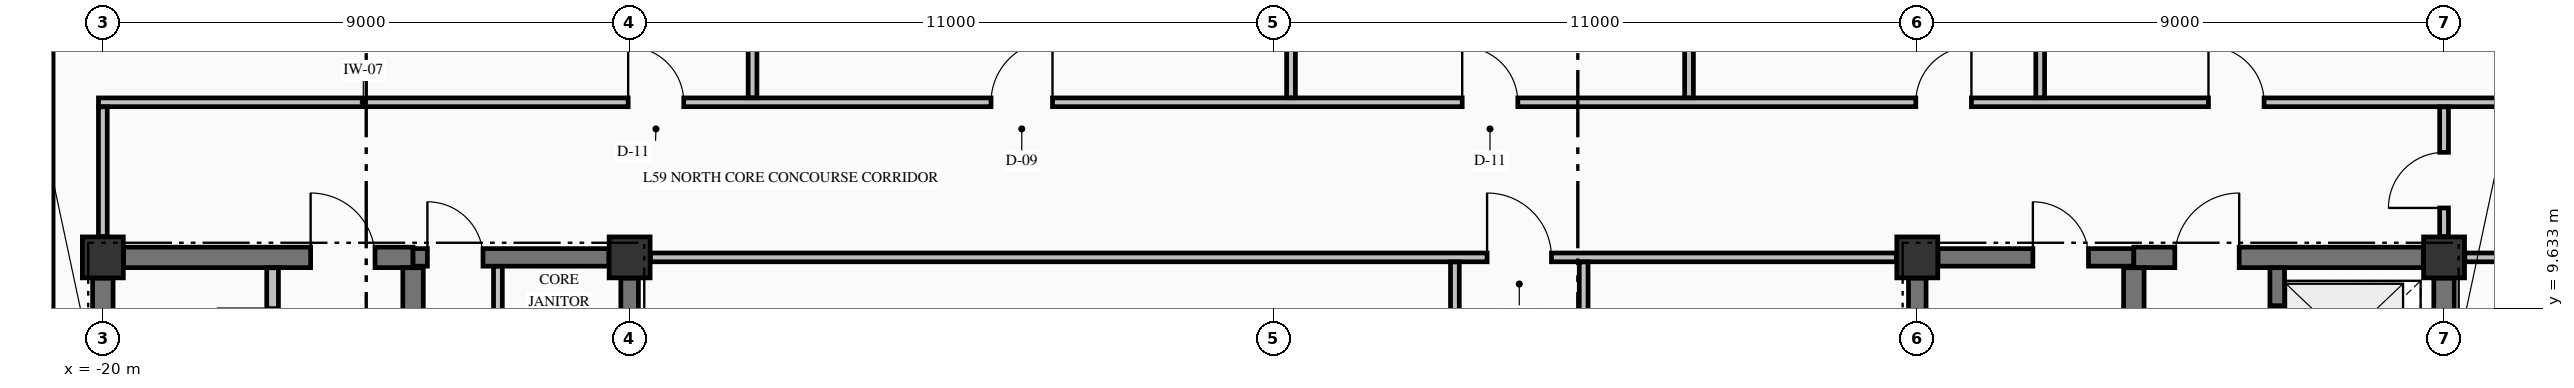
"""IFC4 building model, lengths in metres.
Left out: names, types, materials, properties, quantities, classifications, styles, units other than length and angle.
Written with IfcOpenShell. Run it as: python <this file> out.ifc"""

import sys

from ifc_helpers import new_model, si_unit, direction, frame, frame_2d, origin, origin_2d, place, context, subcontext, project, spatial, rectangle, extrude, element, fill, save


model = new_model("IFC4")
c1 = context("Model", 3, precision=1e-05, world=origin(), true_north=direction((0.0, 1.0)))
c2 = subcontext(c1, "Body", "Model", "MODEL_VIEW")
j1 = project(units=[si_unit("LENGTHUNIT", "METRE"), si_unit("PLANEANGLEUNIT", "RADIAN")], contexts=[c1])
p1 = place(None, origin())
s1 = spatial("IfcSite", under=j1, at=p1, CompositionType="ELEMENT")
p2 = place(p1, origin())
s2 = spatial("IfcBuilding", under=s1, at=p2, CompositionType="ELEMENT")
p3 = place(p2, frame((0.0, 0.0, 226.82)))
s3 = spatial("IfcBuildingStorey", under=s2, at=p3, CompositionType="ELEMENT", Elevation=226.82)
for number, where, z_axis, x_axis in (
    (1, (-20.0, 10.5, -0.425), (0.0, 0.0, 1.0), (1.0, 0.0, 0.0)),
    (2, (-11.0, 10.5, -0.425), (0.0, 0.0, 1.0), (1.0, 0.0, 0.0)),
    (3, (11.0, 10.5, -0.425), (0.0, 0.0, 1.0), (1.0, 0.0, 0.0)),
    (4, (20.0, 10.5, -0.425), (0.0, 0.0, 1.0), (1.0, 0.0, 0.0)),
):
    element("IfcColumn", number, at=place(p3, frame(where, z_axis=z_axis, x_axis=x_axis)), inside=s3, PredefinedType="COLUMN", context=c2, shape_type="SweptSolid", body=[
        extrude(rectangle(XDim=0.7, YDim=0.7, at=origin_2d()), origin(), (0.0, 0.0, 1.0), 3.405),
    ])
p4 = place(p3, frame((-21.0, 17.545, 0.0), z_axis=(0.0, 0.0, 1.0), x_axis=(0.0, -1.0, 0.0)))
e5 = element("IfcWall", 5, at=p4, inside=s3, PredefinedType="STANDARD", context=c2, shape_type="SweptSolid", body=[
    extrude(rectangle(XDim=8.09, YDim=0.3, at=frame_2d((4.045, 0.0))), origin(), (0.0, 0.0, 1.0), 2.372),
])
p5 = place(p3, frame((-19.646, 10.5, 0.0), z_axis=(0.0, 0.0, 1.0), x_axis=(1.0, 0.0, 0.0)))
e6 = element("IfcWall", 6, at=p5, inside=s3, PredefinedType="SHEAR", context=c2, shape_type="SweptSolid", body=[
    extrude(rectangle(XDim=4.946, YDim=0.35, at=frame_2d((2.473, 0.0))), origin(), (0.0, 0.0, 1.0), 2.98),
])
p6 = place(p5, frame((3.196, 0.0, 0.0)))
e7 = element("IfcOpeningElement", 7, at=p6, cuts=e6, PredefinedType="OPENING", context=c2, shape_type="SweptSolid", body=[
    extrude(rectangle(XDim=1.1, YDim=2.15, at=frame_2d((0.55, 1.075))), frame((0.0, 0.185, 0.0), z_axis=(0.0, -1.0, 0.0), x_axis=(1.0, 0.0, 0.0)), (0.0, 0.0, 1.0), 0.37),
])
p7 = place(p3, frame((-14.7, 10.5, 0.0), z_axis=(0.0, 0.0, 1.0), x_axis=(1.0, 0.0, 0.0)))
e8 = element("IfcWall", 8, at=p7, inside=s3, PredefinedType="SHEAR", context=c2, shape_type="SweptSolid", body=[
    extrude(rectangle(XDim=3.346, YDim=0.3, at=frame_2d((1.673, 0.0))), origin(), (0.0, 0.0, 1.0), 2.98),
])
p8 = place(p7, frame((0.245, 0.0, 0.0)))
e9 = element("IfcOpeningElement", 9, at=p8, cuts=e8, PredefinedType="OPENING", context=c2, shape_type="SweptSolid", body=[
    extrude(rectangle(XDim=0.95, YDim=2.15, at=frame_2d((0.475, 1.075))), frame((0.0, 0.16, 0.0), z_axis=(0.0, -1.0, 0.0), x_axis=(1.0, 0.0, 0.0)), (0.0, 0.0, 1.0), 0.32),
])
p9 = place(p3, frame((11.354, 10.5, 0.0), z_axis=(0.0, 0.0, 1.0), x_axis=(1.0, 0.0, 0.0)))
e10 = element("IfcWall", 10, at=p9, inside=s3, PredefinedType="SHEAR", context=c2, shape_type="SweptSolid", body=[
    extrude(rectangle(XDim=3.346, YDim=0.3, at=frame_2d((1.673, 0.0))), origin(), (0.0, 0.0, 1.0), 2.98),
])
p10 = place(p9, frame((1.621, 0.0, 0.0)))
e11 = element("IfcOpeningElement", 11, at=p10, cuts=e10, PredefinedType="OPENING", context=c2, shape_type="SweptSolid", body=[
    extrude(rectangle(XDim=0.95, YDim=2.15, at=frame_2d((0.475, 1.075))), frame((0.0, 0.16, 0.0), z_axis=(0.0, -1.0, 0.0), x_axis=(1.0, 0.0, 0.0)), (0.0, 0.0, 1.0), 0.32),
])
p11 = place(p3, frame((14.7, 10.5, 0.0), z_axis=(0.0, 0.0, 1.0), x_axis=(1.0, 0.0, 0.0)))
e12 = element("IfcWall", 12, at=p11, inside=s3, PredefinedType="SHEAR", context=c2, shape_type="SweptSolid", body=[
    extrude(rectangle(XDim=4.946, YDim=0.35, at=frame_2d((2.473, 0.0))), origin(), (0.0, 0.0, 1.0), 2.98),
])
p12 = place(p11, frame((0.7, 0.0, 0.0)))
e13 = element("IfcOpeningElement", 13, at=p12, cuts=e12, PredefinedType="OPENING", context=c2, shape_type="SweptSolid", body=[
    extrude(rectangle(XDim=1.1, YDim=2.15, at=frame_2d((0.55, 1.075))), frame((0.0, 0.185, 0.0), z_axis=(0.0, -1.0, 0.0), x_axis=(1.0, 0.0, 0.0)), (0.0, 0.0, 1.0), 0.37),
])
p13 = place(p3, frame((-10.644, 10.5, 0.0), z_axis=(0.0, 0.0, 1.0), x_axis=(1.0, 0.0, 0.0)))
e14 = element("IfcWall", 14, at=p13, inside=s3, PredefinedType="PARTITIONING", context=c2, shape_type="SweptSolid", body=[
    extrude(rectangle(XDim=21.288, YDim=0.15, at=frame_2d((10.644, 0.0))), origin(), (0.0, 0.0, 1.0), 2.98),
])
p14 = place(p13, frame((14.294, 0.0, 0.0)))
e15 = element("IfcOpeningElement", 15, at=p14, cuts=e14, PredefinedType="OPENING", context=c2, shape_type="SweptSolid", body=[
    extrude(rectangle(XDim=1.1, YDim=2.15, at=frame_2d((0.55, 1.075))), frame((0.0, 0.085, 0.0), z_axis=(0.0, -1.0, 0.0), x_axis=(1.0, 0.0, 0.0)), (0.0, 0.0, 1.0), 0.17),
])
p15 = place(p3, frame((20.356, 10.5, 0.0), z_axis=(0.0, 0.0, 1.0), x_axis=(1.0, 0.0, 0.0)))
e16 = element("IfcWall", 16, at=p15, inside=s3, PredefinedType="PARTITIONING", context=c2, shape_type="SweptSolid", body=[
    extrude(rectangle(XDim=5.479, YDim=0.15, at=frame_2d((2.74, 0.0))), origin(), (0.0, 0.0, 1.0), 2.98),
])
p16 = place(p15, frame((2.169, 0.0, 0.0)))
e17 = element("IfcOpeningElement", 17, at=p16, cuts=e16, PredefinedType="OPENING", context=c2, shape_type="SweptSolid", body=[
    extrude(rectangle(XDim=0.95, YDim=2.15, at=frame_2d((0.475, 1.075))), frame((0.0, 0.085, 0.0), z_axis=(0.0, -1.0, 0.0), x_axis=(1.0, 0.0, 0.0)), (0.0, 0.0, 1.0), 0.17),
])
p17 = place(p3, frame((-20.075, 13.15, 0.0), z_axis=(0.0, 0.0, 1.0), x_axis=(1.0, 0.0, 0.0)))
e18 = element("IfcWall", 18, at=p17, inside=s3, PredefinedType="PARTITIONING", context=c2, shape_type="SweptSolid", body=[
    extrude(rectangle(XDim=45.91, YDim=0.15, at=frame_2d((22.955, 0.0))), origin(), (0.0, 0.0, 1.0), 2.98),
])
p18 = place(p17, frame((9.05, 0.0, 0.0)))
e19 = element("IfcOpeningElement", 19, at=p18, cuts=e18, PredefinedType="OPENING", context=c2, shape_type="SweptSolid", body=[
    extrude(rectangle(XDim=0.95, YDim=2.15, at=frame_2d((0.475, 1.075))), frame((0.0, 0.085, 0.0), z_axis=(0.0, -1.0, 0.0), x_axis=(1.0, 0.0, 0.0)), (0.0, 0.0, 1.0), 0.17),
])
p19 = place(p17, frame((15.25, 0.0, 0.0)))
e20 = element("IfcOpeningElement", 20, at=p19, cuts=e18, PredefinedType="OPENING", context=c2, shape_type="SweptSolid", body=[
    extrude(rectangle(XDim=1.05, YDim=2.15, at=frame_2d((0.525, 1.075))), frame((0.0, 0.085, 0.0), z_axis=(0.0, -1.0, 0.0), x_axis=(1.0, 0.0, 0.0)), (0.0, 0.0, 1.0), 0.17),
])
p20 = place(p17, frame((23.3, 0.0, 0.0)))
e21 = element("IfcOpeningElement", 21, at=p20, cuts=e18, PredefinedType="OPENING", context=c2, shape_type="SweptSolid", body=[
    extrude(rectangle(XDim=0.95, YDim=2.15, at=frame_2d((0.475, 1.075))), frame((0.0, 0.085, 0.0), z_axis=(0.0, -1.0, 0.0), x_axis=(1.0, 0.0, 0.0)), (0.0, 0.0, 1.0), 0.17),
])
p21 = place(p17, frame((31.05, 0.0, 0.0)))
e22 = element("IfcOpeningElement", 22, at=p21, cuts=e18, PredefinedType="OPENING", context=c2, shape_type="SweptSolid", body=[
    extrude(rectangle(XDim=0.95, YDim=2.15, at=frame_2d((0.475, 1.075))), frame((0.0, 0.085, 0.0), z_axis=(0.0, -1.0, 0.0), x_axis=(1.0, 0.0, 0.0)), (0.0, 0.0, 1.0), 0.17),
])
p22 = place(p17, frame((36.05, 0.0, 0.0)))
e23 = element("IfcOpeningElement", 23, at=p22, cuts=e18, PredefinedType="OPENING", context=c2, shape_type="SweptSolid", body=[
    extrude(rectangle(XDim=0.95, YDim=2.15, at=frame_2d((0.475, 1.075))), frame((0.0, 0.085, 0.0), z_axis=(0.0, -1.0, 0.0), x_axis=(1.0, 0.0, 0.0)), (0.0, 0.0, 1.0), 0.17),
])
p23 = place(p3, frame((-20.0, 5.327, 0.0), z_axis=(0.0, 0.0, 1.0), x_axis=(0.0, 1.0, 0.0)))
e24 = element("IfcWall", 24, at=p23, inside=s3, PredefinedType="SHEAR", context=c2, shape_type="SweptSolid", body=[
    extrude(rectangle(XDim=4.819, YDim=0.35, at=frame_2d((2.41, 0.0))), origin(), (0.0, 0.0, 1.0), 2.98),
])
p24 = place(p3, frame((-14.7, 5.852, 0.0), z_axis=(0.0, 0.0, 1.0), x_axis=(0.0, 1.0, 0.0)))
e25 = element("IfcWall", 25, at=p24, inside=s3, PredefinedType="SHEAR", context=c2, shape_type="SweptSolid", body=[
    extrude(rectangle(XDim=4.471, YDim=0.35, at=frame_2d((2.235, 0.0))), origin(), (0.0, 0.0, 1.0), 2.98),
])
for number, where, z_axis, x_axis in (
    (26, (-11.0, 5.852, 0.0), (0.0, 0.0, 1.0), (0.0, 1.0, 0.0)),
    (27, (11.0, 5.852, 0.0), (0.0, 0.0, 1.0), (0.0, 1.0, 0.0)),
):
    element("IfcWall", number, at=place(p3, frame(where, z_axis=z_axis, x_axis=x_axis)), inside=s3, PredefinedType="SHEAR", context=c2, shape_type="SweptSolid", body=[
        extrude(rectangle(XDim=4.294, YDim=0.3, at=frame_2d((2.147, 0.0))), origin(), (0.0, 0.0, 1.0), 2.98),
    ])
p25 = place(p3, frame((14.7, 5.852, 0.0), z_axis=(0.0, 0.0, 1.0), x_axis=(0.0, 1.0, 0.0)))
e28 = element("IfcWall", 28, at=p25, inside=s3, PredefinedType="SHEAR", context=c2, shape_type="SweptSolid", body=[
    extrude(rectangle(XDim=4.471, YDim=0.35, at=frame_2d((2.235, 0.0))), origin(), (0.0, 0.0, 1.0), 2.98),
])
p26 = place(p3, frame((17.15, 7.877, 0.0), z_axis=(0.0, 0.0, 1.0), x_axis=(0.0, 1.0, 0.0)))
e29 = element("IfcWall", 29, at=p26, inside=s3, PredefinedType="SOLIDWALL", context=c2, shape_type="SweptSolid", body=[
    extrude(rectangle(XDim=2.446, YDim=0.25, at=frame_2d((1.223, 0.0))), origin(), (0.0, 0.0, 1.0), 2.98),
])
p27 = place(p26, frame((0.698, 0.0, 0.0)))
e30 = element("IfcOpeningElement", 30, at=p27, cuts=e29, PredefinedType="OPENING", context=c2, shape_type="SweptSolid", body=[
    extrude(rectangle(XDim=1.1, YDim=2.2, at=frame_2d((0.55, 1.1))), frame((0.0, 0.135, 0.0), z_axis=(0.0, -1.0, 0.0), x_axis=(1.0, 0.0, 0.0)), (0.0, 0.0, 1.0), 0.27),
])
p28 = place(p3, frame((20.0, 7.877, 0.0), z_axis=(0.0, 0.0, 1.0), x_axis=(0.0, 1.0, 0.0)))
e31 = element("IfcWall", 31, at=p28, inside=s3, PredefinedType="SHEAR", context=c2, shape_type="SweptSolid", body=[
    extrude(rectangle(XDim=2.269, YDim=0.35, at=frame_2d((1.135, 0.0))), origin(), (0.0, 0.0, 1.0), 2.98),
])
p29 = place(p3, frame((-20.0, 10.856, 0.0), z_axis=(0.0, 0.0, 1.0), x_axis=(0.0, 1.0, 0.0)))
e32 = element("IfcWall", 32, at=p29, inside=s3, PredefinedType="PARTITIONING", context=c2, shape_type="SweptSolid", body=[
    extrude(rectangle(XDim=2.216, YDim=0.15, at=frame_2d((1.108, 0.0))), origin(), (0.0, 0.0, 1.0), 2.57),
])
p30 = place(p3, frame((-17.1, 7.928, 0.0), z_axis=(0.0, 0.0, 1.0), x_axis=(0.0, 1.0, 0.0)))
e33 = element("IfcWall", 33, at=p30, inside=s3, PredefinedType="PARTITIONING", context=c2, shape_type="SweptSolid", body=[
    extrude(rectangle(XDim=2.394, YDim=0.2, at=frame_2d((1.197, 0.0))), origin(), (0.0, 0.0, 1.0), 2.98),
])
p31 = place(p30, frame((0.747, 0.0, 0.0)))
e34 = element("IfcOpeningElement", 34, at=p31, cuts=e33, PredefinedType="OPENING", context=c2, shape_type="SweptSolid", body=[
    extrude(rectangle(XDim=0.95, YDim=2.15, at=frame_2d((0.475, 1.075))), frame((0.0, 0.11, 0.0), z_axis=(0.0, -1.0, 0.0), x_axis=(1.0, 0.0, 0.0)), (0.0, 0.0, 1.0), 0.22),
])
p32 = place(p3, frame((-13.25, 5.853, 0.0), z_axis=(0.0, 0.0, 1.0), x_axis=(0.0, 1.0, 0.0)))
e35 = element("IfcWall", 35, at=p32, inside=s3, PredefinedType="PARTITIONING", context=c2, shape_type="SweptSolid", body=[
    extrude(rectangle(XDim=4.494, YDim=0.15, at=frame_2d((2.247, 0.0))), origin(), (0.0, 0.0, 1.0), 2.98),
])
p33 = place(p32, frame((1.472, 0.0, 0.0)))
e36 = element("IfcOpeningElement", 36, at=p33, cuts=e35, PredefinedType="OPENING", context=c2, shape_type="SweptSolid", body=[
    extrude(rectangle(XDim=0.95, YDim=2.15, at=frame_2d((0.475, 1.075))), frame((0.0, 0.085, 0.0), z_axis=(0.0, -1.0, 0.0), x_axis=(1.0, 0.0, 0.0)), (0.0, 0.0, 1.0), 0.17),
])
p34 = place(p3, frame((-8.9, 13.228, 0.0), z_axis=(0.0, 0.0, 1.0), x_axis=(0.0, 1.0, 0.0)))
e37 = element("IfcWall", 37, at=p34, inside=s3, PredefinedType="PARTITIONING", context=c2, shape_type="SweptSolid", body=[
    extrude(rectangle(XDim=10.107, YDim=0.15, at=frame_2d((5.053, 0.0))), origin(), (0.0, 0.0, 1.0), 2.98),
])
p35 = place(p3, frame((0.3, 13.228, 0.0), z_axis=(0.0, 0.0, 1.0), x_axis=(0.0, 1.0, 0.0)))
e38 = element("IfcWall", 38, at=p35, inside=s3, PredefinedType="PARTITIONING", context=c2, shape_type="SweptSolid", body=[
    extrude(rectangle(XDim=9.841, YDim=0.15, at=frame_2d((4.92, 0.0))), origin(), (0.0, 0.0, 1.0), 2.395),
])
for number, where, z_axis, x_axis in (
    (39, (3.1, 2.978, 0.0), (0.0, 0.0, 1.0), (0.0, 1.0, 0.0)),
    (40, (5.3, 2.978, 0.0), (0.0, 0.0, 1.0), (0.0, 1.0, 0.0)),
):
    element("IfcWall", number, at=place(p3, frame(where, z_axis=z_axis, x_axis=x_axis)), inside=s3, PredefinedType="PARTITIONING", context=c2, shape_type="SweptSolid", body=[
        extrude(rectangle(XDim=7.444, YDim=0.15, at=frame_2d((3.722, 0.0))), origin(), (0.0, 0.0, 1.0), 2.98),
    ])
for number, where, z_axis, x_axis in (
    (41, (7.1, 13.228, 0.0), (0.0, 0.0, 1.0), (0.0, 1.0, 0.0)),
    (42, (13.1, 13.228, 0.0), (0.0, 0.0, 1.0), (0.0, 1.0, 0.0)),
):
    element("IfcWall", number, at=place(p3, frame(where, z_axis=z_axis, x_axis=x_axis)), inside=s3, PredefinedType="PARTITIONING", context=c2, shape_type="SweptSolid", body=[
        extrude(rectangle(XDim=10.107, YDim=0.15, at=frame_2d((5.053, 0.0))), origin(), (0.0, 0.0, 1.0), 2.98),
    ])
p36 = place(p3, frame((20.0, 10.856, 0.0), z_axis=(0.0, 0.0, 1.0), x_axis=(0.0, 1.0, 0.0)))
e43 = element("IfcWall", 43, at=p36, inside=s3, PredefinedType="PARTITIONING", context=c2, shape_type="SweptSolid", body=[
    extrude(rectangle(XDim=2.216, YDim=0.15, at=frame_2d((1.108, 0.0))), origin(), (0.0, 0.0, 1.0), 2.98),
])
p37 = place(p36, frame((0.489, 0.0, 0.0)))
e44 = element("IfcOpeningElement", 44, at=p37, cuts=e43, PredefinedType="OPENING", context=c2, shape_type="SweptSolid", body=[
    extrude(rectangle(XDim=0.95, YDim=2.15, at=frame_2d((0.475, 1.075))), frame((0.0, 0.085, 0.0), z_axis=(0.0, -1.0, 0.0), x_axis=(1.0, 0.0, 0.0)), (0.0, 0.0, 1.0), 0.17),
])
p38 = place(p8, origin())
e45 = element("IfcDoor", 45, at=p38, inside=s3, OperationType="SINGLE_SWING_LEFT", PredefinedType="DOOR", context=c2, shape_type="SweptSolid", body=[
    extrude(rectangle(XDim=0.95, YDim=2.15, at=frame_2d((0.475, 1.075))), frame((0.0, 0.025, 0.0), z_axis=(0.0, -1.0, 0.0), x_axis=(1.0, 0.0, 0.0)), (0.0, 0.0, 1.0), 0.05),
])
fill(e9, e45)
p39 = place(p10, origin())
e46 = element("IfcDoor", 46, at=p39, inside=s3, OperationType="SINGLE_SWING_LEFT", PredefinedType="DOOR", context=c2, shape_type="SweptSolid", body=[
    extrude(rectangle(XDim=0.95, YDim=2.15, at=frame_2d((0.475, 1.075))), frame((0.0, 0.025, 0.0), z_axis=(0.0, -1.0, 0.0), x_axis=(1.0, 0.0, 0.0)), (0.0, 0.0, 1.0), 0.05),
])
fill(e11, e46)
p40 = place(p6, origin())
e47 = element("IfcDoor", 47, at=p40, inside=s3, OperationType="SINGLE_SWING_LEFT", PredefinedType="DOOR", context=c2, shape_type="SweptSolid", body=[
    extrude(rectangle(XDim=1.1, YDim=2.15, at=frame_2d((0.55, 1.075))), frame((0.0, 0.025, 0.0), z_axis=(0.0, -1.0, 0.0), x_axis=(1.0, 0.0, 0.0)), (0.0, 0.0, 1.0), 0.05),
])
fill(e7, e47)
p41 = place(p27, origin())
e48 = element("IfcDoor", 48, at=p41, inside=s3, OperationType="SLIDING_TO_RIGHT", PredefinedType="DOOR", context=c2, shape_type="SweptSolid", body=[
    extrude(rectangle(XDim=1.1, YDim=2.2, at=frame_2d((0.55, 1.1))), frame((0.0, 0.025, 0.0), z_axis=(0.0, -1.0, 0.0), x_axis=(1.0, 0.0, 0.0)), (0.0, 0.0, 1.0), 0.05),
])
fill(e30, e48)
p42 = place(p12, origin())
e49 = element("IfcDoor", 49, at=p42, inside=s3, OperationType="SINGLE_SWING_RIGHT", PredefinedType="DOOR", context=c2, shape_type="SweptSolid", body=[
    extrude(rectangle(XDim=1.1, YDim=2.15, at=frame_2d((0.55, 1.075))), frame((0.0, 0.025, 0.0), z_axis=(0.0, -1.0, 0.0), x_axis=(1.0, 0.0, 0.0)), (0.0, 0.0, 1.0), 0.05),
])
fill(e13, e49)
p43 = place(p14, origin())
e50 = element("IfcDoor", 50, at=p43, inside=s3, OperationType="SINGLE_SWING_LEFT", PredefinedType="DOOR", context=c2, shape_type="SweptSolid", body=[
    extrude(rectangle(XDim=1.1, YDim=2.15, at=frame_2d((0.55, 1.075))), frame((0.0, 0.025, 0.0), z_axis=(0.0, -1.0, 0.0), x_axis=(1.0, 0.0, 0.0)), (0.0, 0.0, 1.0), 0.05),
])
fill(e15, e50)
p44 = place(p18, origin())
e51 = element("IfcDoor", 51, at=p44, inside=s3, OperationType="SINGLE_SWING_LEFT", PredefinedType="DOOR", context=c2, shape_type="SweptSolid", body=[
    extrude(rectangle(XDim=0.95, YDim=2.15, at=frame_2d((0.475, 1.075))), frame((0.0, 0.025, 0.0), z_axis=(0.0, -1.0, 0.0), x_axis=(1.0, 0.0, 0.0)), (0.0, 0.0, 1.0), 0.05),
])
fill(e19, e51)
p45 = place(p19, origin())
e52 = element("IfcDoor", 52, at=p45, inside=s3, OperationType="SINGLE_SWING_RIGHT", PredefinedType="DOOR", context=c2, shape_type="SweptSolid", body=[
    extrude(rectangle(XDim=1.05, YDim=2.15, at=frame_2d((0.525, 1.075))), frame((0.0, 0.025, 0.0), z_axis=(0.0, -1.0, 0.0), x_axis=(1.0, 0.0, 0.0)), (0.0, 0.0, 1.0), 0.05),
])
fill(e20, e52)
p46 = place(p20, origin())
e53 = element("IfcDoor", 53, at=p46, inside=s3, OperationType="SINGLE_SWING_LEFT", PredefinedType="DOOR", context=c2, shape_type="SweptSolid", body=[
    extrude(rectangle(XDim=0.95, YDim=2.15, at=frame_2d((0.475, 1.075))), frame((0.0, 0.025, 0.0), z_axis=(0.0, -1.0, 0.0), x_axis=(1.0, 0.0, 0.0)), (0.0, 0.0, 1.0), 0.05),
])
fill(e21, e53)
p47 = place(p21, origin())
e54 = element("IfcDoor", 54, at=p47, inside=s3, OperationType="SINGLE_SWING_RIGHT", PredefinedType="DOOR", context=c2, shape_type="SweptSolid", body=[
    extrude(rectangle(XDim=0.95, YDim=2.15, at=frame_2d((0.475, 1.075))), frame((0.0, 0.025, 0.0), z_axis=(0.0, -1.0, 0.0), x_axis=(1.0, 0.0, 0.0)), (0.0, 0.0, 1.0), 0.05),
])
fill(e22, e54)
p48 = place(p22, origin())
e55 = element("IfcDoor", 55, at=p48, inside=s3, OperationType="SINGLE_SWING_LEFT", PredefinedType="DOOR", context=c2, shape_type="SweptSolid", body=[
    extrude(rectangle(XDim=0.95, YDim=2.15, at=frame_2d((0.475, 1.075))), frame((0.0, 0.025, 0.0), z_axis=(0.0, -1.0, 0.0), x_axis=(1.0, 0.0, 0.0)), (0.0, 0.0, 1.0), 0.05),
])
fill(e23, e55)
p49 = place(p37, origin())
e56 = element("IfcDoor", 56, at=p49, inside=s3, OperationType="SINGLE_SWING_LEFT", PredefinedType="DOOR", context=c2, shape_type="SweptSolid", body=[
    extrude(rectangle(XDim=0.95, YDim=2.15, at=frame_2d((0.475, 1.075))), frame((0.0, 0.025, 0.0), z_axis=(0.0, -1.0, 0.0), x_axis=(1.0, 0.0, 0.0)), (0.0, 0.0, 1.0), 0.05),
])
fill(e44, e56)
save(model, sys.argv[1])
